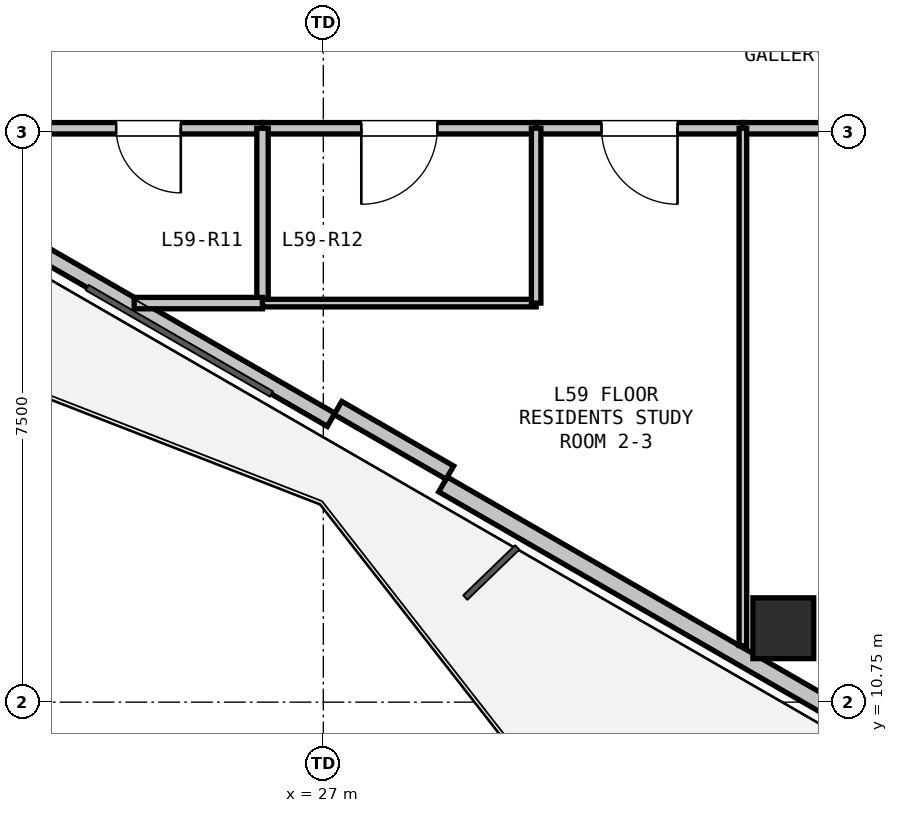
"""IFC4 building model, lengths in metres.
Left out: names, types, materials, properties, quantities, classifications, styles, units other than length and angle.
Written with IfcOpenShell. Run it as: python <this file> out.ifc"""

import sys

from ifc_helpers import new_model, si_unit, direction, frame, frame_2d, origin, origin_2d, place, context, subcontext, project, spatial, rectangle, hollow_rectangle, extrude, element, fill, save


model = new_model("IFC4")
c1 = context("Model", 3, precision=1e-05, world=origin(), true_north=direction((0.0, 1.0)))
c2 = subcontext(c1, "Body", "Model", "MODEL_VIEW")
j1 = project(units=[si_unit("LENGTHUNIT", "METRE"), si_unit("PLANEANGLEUNIT", "RADIAN")], contexts=[c1])
p1 = place(None, origin())
s1 = spatial("IfcSite", under=j1, at=p1, CompositionType="ELEMENT")
p2 = place(p1, origin())
s2 = spatial("IfcBuilding", under=s1, at=p2, CompositionType="ELEMENT")
p3 = place(p2, frame((0.0, 0.0, 211.8)))
s3 = spatial("IfcBuildingStorey", under=s2, at=p3, CompositionType="ELEMENT", Elevation=211.8)
p4 = place(p3, frame((33.052, 11.722, 0.0), z_axis=(0.0, 0.0, 1.0), x_axis=(1.0, 0.0, 0.0)))
e1 = element("IfcColumn", 1, at=p4, inside=s3, PredefinedType="COLUMN", context=c2, shape_type="SweptSolid", body=[
    extrude(hollow_rectangle(XDim=0.8, YDim=0.8, WallThickness=0.025, at=origin_2d()), origin(), (0.0, 0.0, 1.0), 3.3),
])
p5 = place(p3, frame((36.974, 8.765, 0.0), z_axis=(0.0, 0.0, 1.0), x_axis=(-0.866016233231, 0.500015883528, 0.0)))
e2 = element("IfcWall", 2, at=p5, inside=s3, PredefinedType="SOLIDWALL", context=c2, shape_type="SweptSolid", body=[
    extrude(rectangle(XDim=9.699, YDim=0.225, at=frame_2d((4.85, 0.0))), origin(), (0.0, 0.0, 1.0), 2.69),
])
p6 = place(p5, frame((1.73, 0.0, 0.0)))
e3 = element("IfcOpeningElement", 3, at=p6, cuts=e2, PredefinedType="OPENING", context=c2, shape_type="SweptSolid", body=[
    extrude(rectangle(XDim=1.0, YDim=2.1, at=frame_2d((0.5, 1.05))), frame((0.0, 0.123, 0.0), z_axis=(0.0, -1.0, 0.0), x_axis=(1.0, 0.0, 0.0)), (0.0, 0.0, 1.0), 0.245),
])
p7 = place(p3, frame((27.102, 14.464, 0.0), z_axis=(0.0, 0.0, 1.0), x_axis=(-0.866020680503, 0.500008180874, 0.0)))
e4 = element("IfcWall", 4, at=p7, inside=s3, PredefinedType="PARAPET", context=c2, shape_type="SweptSolid", body=[
    extrude(rectangle(XDim=8.999, YDim=0.2, at=frame_2d((4.5, 0.0))), origin(), (0.0, 0.0, 1.0), 0.2),
])
p8 = place(p3, frame((28.665, 13.77, 0.0), z_axis=(0.0, 0.0, 1.0), x_axis=(-0.866025371046, 0.500000056704, 0.0)))
e5 = element("IfcWall", 5, at=p8, inside=s3, PredefinedType="PARAPET", context=c2, shape_type="SweptSolid", body=[
    extrude(rectangle(XDim=1.7, YDim=0.2, at=frame_2d((0.85, 0.0))), origin(), (0.0, 0.0, 1.0), 2.69),
])
p9 = place(p3, frame((39.2, 18.3, 0.0), z_axis=(0.0, 0.0, 1.0), x_axis=(-1.0, 0.0, 0.0)))
e6 = element("IfcWall", 6, at=p9, inside=s3, PredefinedType="PARTITIONING", context=c2, shape_type="SweptSolid", body=[
    extrude(rectangle(XDim=6.68, YDim=0.15, at=frame_2d((3.34, 0.0))), origin(), (0.0, 0.0, 1.0), 2.518),
])
p10 = place(p9, frame((2.84, 0.0, 0.0)))
e7 = element("IfcOpeningElement", 7, at=p10, cuts=e6, PredefinedType="OPENING", context=c2, shape_type="SweptSolid", body=[
    extrude(rectangle(XDim=1.0, YDim=2.15, at=frame_2d((0.5, 1.075))), frame((0.0, 0.085, 0.0), z_axis=(0.0, -1.0, 0.0), x_axis=(1.0, 0.0, 0.0)), (0.0, 0.0, 1.0), 0.17),
])
p11 = place(p3, frame((32.52, 18.3, 0.0), z_axis=(0.0, 0.0, 1.0), x_axis=(-1.0, 0.0, 0.0)))
e8 = element("IfcWall", 8, at=p11, inside=s3, PredefinedType="PARTITIONING", context=c2, shape_type="SweptSolid", body=[
    extrude(rectangle(XDim=2.72, YDim=0.15, at=frame_2d((1.36, 0.0))), origin(), (0.0, 0.0, 1.0), 3.07),
])
p12 = place(p11, frame((0.86, 0.0, 0.0)))
e9 = element("IfcOpeningElement", 9, at=p12, cuts=e8, PredefinedType="OPENING", context=c2, shape_type="SweptSolid", body=[
    extrude(rectangle(XDim=1.0, YDim=2.15, at=frame_2d((0.5, 1.075))), frame((0.0, 0.085, 0.0), z_axis=(0.0, -1.0, 0.0), x_axis=(1.0, 0.0, 0.0)), (0.0, 0.0, 1.0), 0.17),
])
p13 = place(p3, frame((29.8, 18.3, 0.0), z_axis=(0.0, 0.0, 1.0), x_axis=(-1.0, 0.0, 0.0)))
e10 = element("IfcWall", 10, at=p13, inside=s3, PredefinedType="PARTITIONING", context=c2, shape_type="SweptSolid", body=[
    extrude(rectangle(XDim=3.6, YDim=0.15, at=frame_2d((1.8, 0.0))), origin(), (0.0, 0.0, 1.0), 3.07),
])
p14 = place(p13, frame((1.3, 0.0, 0.0)))
e11 = element("IfcOpeningElement", 11, at=p14, cuts=e10, PredefinedType="OPENING", context=c2, shape_type="SweptSolid", body=[
    extrude(rectangle(XDim=1.0, YDim=2.15, at=frame_2d((0.5, 1.075))), frame((0.0, 0.085, 0.0), z_axis=(0.0, -1.0, 0.0), x_axis=(1.0, 0.0, 0.0)), (0.0, 0.0, 1.0), 0.17),
])
p15 = place(p3, frame((26.2, 18.3, 0.0), z_axis=(0.0, 0.0, 1.0), x_axis=(-1.0, 0.0, 0.0)))
e12 = element("IfcWall", 12, at=p15, inside=s3, PredefinedType="PARTITIONING", context=c2, shape_type="SweptSolid", body=[
    extrude(rectangle(XDim=3.0, YDim=0.15, at=frame_2d((1.5, 0.0))), origin(), (0.0, 0.0, 1.0), 2.518),
])
p16 = place(p15, frame((1.075, 0.0, 0.0)))
e13 = element("IfcOpeningElement", 13, at=p16, cuts=e12, PredefinedType="OPENING", context=c2, shape_type="SweptSolid", body=[
    extrude(rectangle(XDim=0.85, YDim=2.1, at=frame_2d((0.425, 1.05))), frame((0.0, 0.085, 0.0), z_axis=(0.0, -1.0, 0.0), x_axis=(1.0, 0.0, 0.0)), (0.0, 0.0, 1.0), 0.17),
])
p17 = place(p3, frame((26.2, 18.3, 0.0), z_axis=(0.0, 0.0, 1.0), x_axis=(0.0, -1.0, 0.0)))
e14 = element("IfcWall", 14, at=p17, inside=s3, PredefinedType="PARTITIONING", context=c2, shape_type="SweptSolid", body=[
    extrude(rectangle(XDim=2.3, YDim=0.15, at=frame_2d((1.15, 0.0))), origin(), (0.0, 0.0, 1.0), 2.518),
])
p18 = place(p3, frame((26.2, 16.0, 0.0), z_axis=(0.0, 0.0, 1.0), x_axis=(-1.0, 0.0, 0.0)))
e15 = element("IfcWall", 15, at=p18, inside=s3, PredefinedType="PARTITIONING", context=c2, shape_type="SweptSolid", body=[
    extrude(rectangle(XDim=1.688, YDim=0.15, at=frame_2d((0.844, 0.0))), origin(), (0.0, 0.0, 1.0), 2.365),
])
p19 = place(p3, frame((29.8, 16.0, 0.0), z_axis=(0.0, 0.0, 1.0), x_axis=(-1.0, 0.0, 0.0)))
e16 = element("IfcWall", 16, at=p19, inside=s3, PredefinedType="PARTITIONING", context=c2, shape_type="SweptSolid", body=[
    extrude(rectangle(XDim=3.6, YDim=0.1, at=frame_2d((1.8, 0.0))), origin(), (0.0, 0.0, 1.0), 2.518),
])
p20 = place(p3, frame((29.8, 18.3, 0.0), z_axis=(0.0, 0.0, 1.0), x_axis=(0.0, -1.0, 0.0)))
e17 = element("IfcWall", 17, at=p20, inside=s3, PredefinedType="PARTITIONING", context=c2, shape_type="SweptSolid", body=[
    extrude(rectangle(XDim=2.3, YDim=0.125, at=frame_2d((1.15, 0.0))), origin(), (0.0, 0.0, 1.0), 3.07),
])
p21 = place(p3, frame((32.52, 18.3, 0.0), z_axis=(0.0, 0.0, 1.0), x_axis=(0.0, -1.0, 0.0)))
e18 = element("IfcWall", 18, at=p21, inside=s3, PredefinedType="PARTITIONING", context=c2, shape_type="SweptSolid", body=[
    extrude(rectangle(XDim=6.806, YDim=0.1, at=frame_2d((3.403, 0.0))), origin(), (0.0, 0.0, 1.0), 2.365),
])
p22 = place(p16, origin())
e19 = element("IfcDoor", 19, at=p22, inside=s3, OperationType="SINGLE_SWING_LEFT", PredefinedType="DOOR", context=c2, shape_type="SweptSolid", body=[
    extrude(rectangle(XDim=0.85, YDim=2.1, at=frame_2d((0.425, 1.05))), frame((0.0, 0.025, 0.0), z_axis=(0.0, -1.0, 0.0), x_axis=(1.0, 0.0, 0.0)), (0.0, 0.0, 1.0), 0.05),
])
fill(e13, e19)
p23 = place(p14, origin())
e20 = element("IfcDoor", 20, at=p23, inside=s3, OperationType="SINGLE_SWING_RIGHT", PredefinedType="DOOR", context=c2, shape_type="SweptSolid", body=[
    extrude(rectangle(XDim=1.0, YDim=2.15, at=frame_2d((0.5, 1.075))), frame((0.0, 0.025, 0.0), z_axis=(0.0, -1.0, 0.0), x_axis=(1.0, 0.0, 0.0)), (0.0, 0.0, 1.0), 0.05),
])
fill(e11, e20)
p24 = place(p12, origin())
e21 = element("IfcDoor", 21, at=p24, inside=s3, OperationType="SINGLE_SWING_LEFT", PredefinedType="DOOR", context=c2, shape_type="SweptSolid", body=[
    extrude(rectangle(XDim=1.0, YDim=2.15, at=frame_2d((0.5, 1.075))), frame((0.0, 0.025, 0.0), z_axis=(0.0, -1.0, 0.0), x_axis=(1.0, 0.0, 0.0)), (0.0, 0.0, 1.0), 0.05),
])
fill(e9, e21)
save(model, sys.argv[1])
